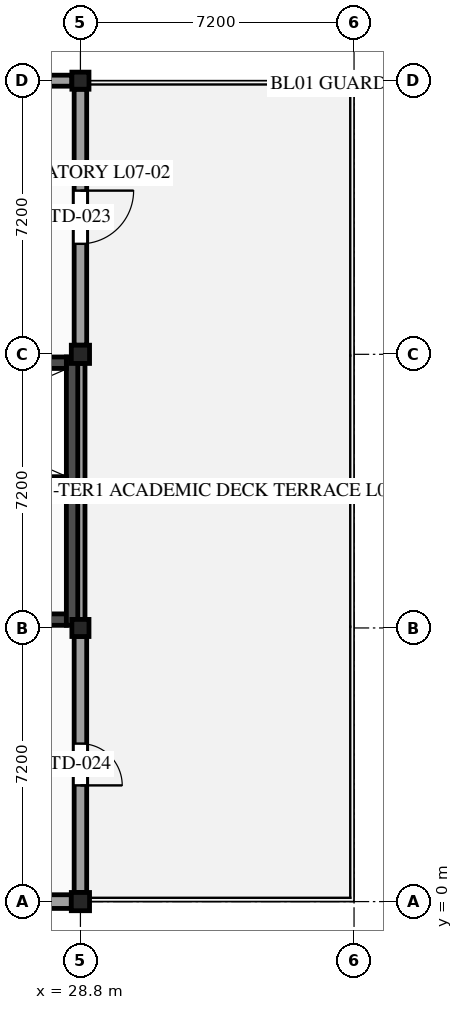
"""IFC4 building model, lengths in metres.
Left out: names, types, materials, properties, quantities, classifications, styles, units other than length and angle.
Written with IfcOpenShell. Run it as: python <this file> out.ifc"""

import sys

from ifc_helpers import new_model, si_unit, direction, frame, frame_2d, origin, origin_2d, place, context, subcontext, project, spatial, rectangle, extrude, element, fill, save


model = new_model("IFC4")
c1 = context("Model", 3, precision=1e-05, world=origin(), true_north=direction((0.0, 1.0)))
c2 = subcontext(c1, "Body", "Model", "MODEL_VIEW")
j1 = project(units=[si_unit("LENGTHUNIT", "METRE"), si_unit("PLANEANGLEUNIT", "RADIAN")], contexts=[c1])
p1 = place(None, origin())
s1 = spatial("IfcSite", under=j1, at=p1, CompositionType="ELEMENT")
p2 = place(p1, origin())
s2 = spatial("IfcBuilding", under=s1, at=p2, CompositionType="ELEMENT")
p3 = place(p2, frame((0.0, 0.0, 30.6)))
s3 = spatial("IfcBuildingStorey", under=s2, at=p3, CompositionType="ELEMENT", Elevation=30.6)
p4 = place(p3, frame((28.8, 0.0, 0.0), z_axis=(0.0, 0.0, 1.0), x_axis=(1.0, 0.0, 0.0)))
e1 = element("IfcColumn", 1, at=p4, inside=s3, PredefinedType="COLUMN", context=c2, shape_type="SweptSolid", body=[
    extrude(rectangle(XDim=0.48, YDim=0.48, at=origin_2d()), origin(), (0.0, 0.0, 1.0), 3.9),
])
p5 = place(p3, frame((28.8, 7.2, 0.0), z_axis=(0.0, 0.0, 1.0), x_axis=(1.0, 0.0, 0.0)))
e2 = element("IfcColumn", 2, at=p5, inside=s3, PredefinedType="COLUMN", context=c2, shape_type="SweptSolid", body=[
    extrude(rectangle(XDim=0.45, YDim=0.45, at=origin_2d()), origin(), (0.0, 0.0, 1.0), 3.9),
])
p6 = place(p3, frame((28.8, 14.4, 0.0), z_axis=(0.0, 0.0, 1.0), x_axis=(1.0, 0.0, 0.0)))
e3 = element("IfcColumn", 3, at=p6, inside=s3, PredefinedType="COLUMN", context=c2, shape_type="SweptSolid", body=[
    extrude(rectangle(XDim=0.48, YDim=0.48, at=origin_2d()), origin(), (0.0, 0.0, 1.0), 3.9),
])
p7 = place(p3, frame((28.8, 21.6, 0.0), z_axis=(0.0, 0.0, 1.0), x_axis=(1.0, 0.0, 0.0)))
e4 = element("IfcColumn", 4, at=p7, inside=s3, PredefinedType="COLUMN", context=c2, shape_type="SweptSolid", body=[
    extrude(rectangle(XDim=0.45, YDim=0.45, at=origin_2d()), origin(), (0.0, 0.0, 1.0), 3.9),
])
p8 = place(p3, frame((21.84, 21.6, 0.0), z_axis=(0.0, 0.0, 1.0), x_axis=(1.0, 0.0, 0.0)))
e5 = element("IfcWall", 5, at=p8, inside=s3, PredefinedType="STANDARD", context=c2, shape_type="SweptSolid", body=[
    extrude(rectangle(XDim=6.735, YDim=0.29, at=frame_2d((3.367, 0.0))), origin(), (0.0, 0.0, 1.0), 2.88),
])
p9 = place(p8, frame((1.268, 0.0, 0.98)))
e6 = element("IfcOpeningElement", 6, at=p9, cuts=e5, PredefinedType="OPENING", context=c2, shape_type="SweptSolid", body=[
    extrude(rectangle(XDim=4.2, YDim=1.5, at=frame_2d((2.1, 0.75))), frame((0.0, 0.155, 0.0), z_axis=(0.0, -1.0, 0.0), x_axis=(1.0, 0.0, 0.0)), (0.0, 0.0, 1.0), 0.31),
])
p10 = place(p3, frame((28.8, 21.375, 0.0), z_axis=(0.0, 0.0, 1.0), x_axis=(0.0, -1.0, 0.0)))
e7 = element("IfcWall", 7, at=p10, inside=s3, PredefinedType="STANDARD", context=c2, shape_type="SweptSolid", body=[
    extrude(rectangle(XDim=6.735, YDim=0.33, at=frame_2d((3.368, 0.0))), origin(), (0.0, 0.0, 1.0), 2.88),
])
p11 = place(p10, frame((2.667, 0.0, 0.0)))
e8 = element("IfcOpeningElement", 8, at=p11, cuts=e7, PredefinedType="OPENING", context=c2, shape_type="SweptSolid", body=[
    extrude(rectangle(XDim=1.4, YDim=2.25, at=frame_2d((0.7, 1.125))), frame((0.0, 0.175, 0.0), z_axis=(0.0, -1.0, 0.0), x_axis=(1.0, 0.0, 0.0)), (0.0, 0.0, 1.0), 0.35),
])
p12 = place(p3, frame((28.8, 14.16, 0.0), z_axis=(0.0, 0.0, 1.0), x_axis=(0.0, -1.0, 0.0)))
e9 = element("IfcWall", 9, at=p12, inside=s3, PredefinedType="STANDARD", context=c2, shape_type="SweptSolid", body=[
    extrude(rectangle(XDim=6.735, YDim=0.24, at=frame_2d((3.367, 0.0))), origin(), (0.0, 0.0, 1.0), 2.88),
])
p13 = place(p3, frame((28.8, 6.975, 0.0), z_axis=(0.0, 0.0, 1.0), x_axis=(0.0, -1.0, 0.0)))
e10 = element("IfcWall", 10, at=p13, inside=s3, PredefinedType="STANDARD", context=c2, shape_type="SweptSolid", body=[
    extrude(rectangle(XDim=6.735, YDim=0.33, at=frame_2d((3.368, 0.0))), origin(), (0.0, 0.0, 1.0), 2.88),
])
p14 = place(p13, frame((2.817, 0.0, 0.0)))
e11 = element("IfcOpeningElement", 11, at=p14, cuts=e10, PredefinedType="OPENING", context=c2, shape_type="SweptSolid", body=[
    extrude(rectangle(XDim=1.1, YDim=2.2, at=frame_2d((0.55, 1.1))), frame((0.0, 0.175, 0.0), z_axis=(0.0, -1.0, 0.0), x_axis=(1.0, 0.0, 0.0)), (0.0, 0.0, 1.0), 0.35),
])
p15 = place(p3, frame((28.56, 0.0, 0.0), z_axis=(0.0, 0.0, 1.0), x_axis=(-1.0, 0.0, 0.0)))
e12 = element("IfcWall", 12, at=p15, inside=s3, PredefinedType="STANDARD", context=c2, shape_type="SweptSolid", body=[
    extrude(rectangle(XDim=6.735, YDim=0.36, at=frame_2d((3.368, 0.0))), origin(), (0.0, 0.0, 1.0), 2.88),
])
p16 = place(p15, frame((1.446, 0.0, 1.15)))
e13 = element("IfcOpeningElement", 13, at=p16, cuts=e12, PredefinedType="OPENING", context=c2, shape_type="SweptSolid", body=[
    extrude(rectangle(XDim=1.15, YDim=1.2, at=frame_2d((0.575, 0.6))), frame((0.0, 0.19, 0.0), z_axis=(0.0, -1.0, 0.0), x_axis=(1.0, 0.0, 0.0)), (0.0, 0.0, 1.0), 0.38),
])
p17 = place(p15, frame((4.139, 0.0, 1.15)))
e14 = element("IfcOpeningElement", 14, at=p17, cuts=e12, PredefinedType="OPENING", context=c2, shape_type="SweptSolid", body=[
    extrude(rectangle(XDim=1.15, YDim=1.2, at=frame_2d((0.575, 0.6))), frame((0.0, 0.19, 0.0), z_axis=(0.0, -1.0, 0.0), x_axis=(1.0, 0.0, 0.0)), (0.0, 0.0, 1.0), 0.38),
])
p18 = place(p3, frame((21.75, 7.42, 0.0), z_axis=(0.0, 0.0, 1.0), x_axis=(1.0, 0.0, 0.0)))
e15 = element("IfcWall", 15, at=p18, inside=s3, PredefinedType="SHEAR", context=c2, shape_type="SweptSolid", body=[
    extrude(rectangle(XDim=6.68, YDim=0.3, at=frame_2d((3.34, 0.0))), origin(), (0.0, 0.0, 1.0), 3.685),
])
p19 = place(p18, frame((2.22, 0.0, 0.0)))
e16 = element("IfcOpeningElement", 16, at=p19, cuts=e15, PredefinedType="OPENING", context=c2, shape_type="SweptSolid", body=[
    extrude(rectangle(XDim=1.8, YDim=2.2, at=frame_2d((0.9, 1.1))), frame((0.0, 0.16, 0.0), z_axis=(0.0, -1.0, 0.0), x_axis=(1.0, 0.0, 0.0)), (0.0, 0.0, 1.0), 0.32),
])
p20 = place(p3, frame((28.58, 7.27, 0.0), z_axis=(0.0, 0.0, 1.0), x_axis=(0.0, 1.0, 0.0)))
e17 = element("IfcWall", 17, at=p20, inside=s3, PredefinedType="SHEAR", context=c2, shape_type="SweptSolid", body=[
    extrude(rectangle(XDim=7.06, YDim=0.3, at=frame_2d((3.53, 0.0))), origin(), (0.0, 0.0, 1.0), 3.685),
])
p21 = place(p3, frame((21.75, 14.18, 0.0), z_axis=(0.0, 0.0, 1.0), x_axis=(1.0, 0.0, 0.0)))
e18 = element("IfcWall", 18, at=p21, inside=s3, PredefinedType="SHEAR", context=c2, shape_type="SweptSolid", body=[
    extrude(rectangle(XDim=6.68, YDim=0.3, at=frame_2d((3.34, 0.0))), origin(), (0.0, 0.0, 1.0), 3.685),
])
p22 = place(p3, frame((21.75, 11.05, 0.0), z_axis=(0.0, 0.0, 1.0), x_axis=(1.0, 0.0, 0.0)))
e19 = element("IfcWall", 19, at=p22, inside=s3, PredefinedType="SHEAR", context=c2, shape_type="SweptSolid", body=[
    extrude(rectangle(XDim=6.68, YDim=0.26, at=frame_2d((3.34, 0.0))), origin(), (0.0, 0.0, 1.0), 3.685),
])
p23 = place(p22, frame((0.95, 0.0, 0.0)))
e20 = element("IfcOpeningElement", 20, at=p23, cuts=e19, PredefinedType="OPENING", context=c2, shape_type="SweptSolid", body=[
    extrude(rectangle(XDim=1.1, YDim=2.2, at=frame_2d((0.55, 1.1))), frame((0.0, 0.14, 0.0), z_axis=(0.0, -1.0, 0.0), x_axis=(1.0, 0.0, 0.0)), (0.0, 0.0, 1.0), 0.28),
])
p24 = place(p22, frame((4.1, 0.0, 0.0)))
e21 = element("IfcOpeningElement", 21, at=p24, cuts=e19, PredefinedType="OPENING", context=c2, shape_type="SweptSolid", body=[
    extrude(rectangle(XDim=1.0, YDim=2.15, at=frame_2d((0.5, 1.075))), frame((0.0, 0.14, 0.0), z_axis=(0.0, -1.0, 0.0), x_axis=(1.0, 0.0, 0.0)), (0.0, 0.0, 1.0), 0.28),
])
p25 = place(p11, origin())
e22 = element("IfcDoor", 22, at=p25, inside=s3, OperationType="SINGLE_SWING_LEFT", PredefinedType="DOOR", context=c2, shape_type="SweptSolid", body=[
    extrude(rectangle(XDim=1.4, YDim=2.25, at=frame_2d((0.7, 1.125))), frame((0.0, 0.025, 0.0), z_axis=(0.0, -1.0, 0.0), x_axis=(1.0, 0.0, 0.0)), (0.0, 0.0, 1.0), 0.05),
])
fill(e8, e22)
p26 = place(p14, origin())
e23 = element("IfcDoor", 23, at=p26, inside=s3, OperationType="SINGLE_SWING_RIGHT", PredefinedType="DOOR", context=c2, shape_type="SweptSolid", body=[
    extrude(rectangle(XDim=1.1, YDim=2.2, at=frame_2d((0.55, 1.1))), frame((0.0, 0.025, 0.0), z_axis=(0.0, -1.0, 0.0), x_axis=(1.0, 0.0, 0.0)), (0.0, 0.0, 1.0), 0.05),
])
fill(e11, e23)
save(model, sys.argv[1])
